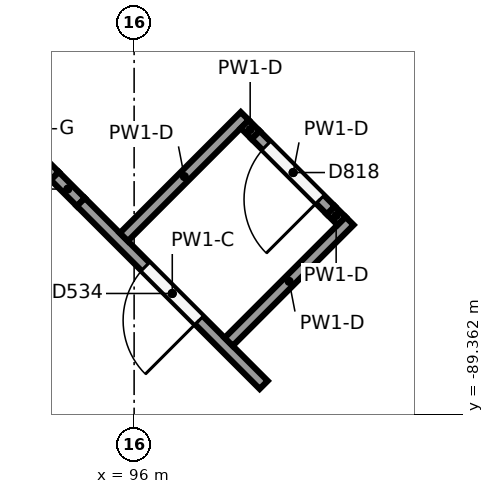
"""IFC4 building model, lengths in metres.
Left out: names, types, materials, properties, quantities, classifications, styles, units other than length and angle.
Written with IfcOpenShell. Run it as: python <this file> out.ifc"""

import sys

from ifc_helpers import new_model, si_unit, direction, frame, frame_2d, origin, origin_2d, place, context, subcontext, project, spatial, rectangle, circle, extrude, element, fill, save


model = new_model("IFC4")
c1 = context("Model", 3, precision=1e-05, world=origin(), true_north=direction((0.0, 1.0)))
c2 = subcontext(c1, "Body", "Model", "MODEL_VIEW")
j1 = project(units=[si_unit("LENGTHUNIT", "METRE"), si_unit("PLANEANGLEUNIT", "RADIAN")], contexts=[c1])
p1 = place(None, origin())
s1 = spatial("IfcSite", under=j1, at=p1, CompositionType="ELEMENT")
p2 = place(p1, origin())
s2 = spatial("IfcBuilding", under=s1, at=p2, CompositionType="ELEMENT")
p3 = place(p2, origin())
s3 = spatial("IfcBuildingStorey", under=s2, at=p3, CompositionType="ELEMENT", Elevation=0.0)
p4 = place(p3, frame((95.793, -85.201, -0.3), z_axis=(0.0, 0.0, 1.0), x_axis=(1.0, 0.0, 0.0)))
e1 = element("IfcColumn", 1, at=p4, inside=s3, PredefinedType="COLUMN", context=c2, shape_type="SweptSolid", body=[
    extrude(circle(Radius=0.3, at=origin_2d()), origin(), (0.0, 0.0, 1.0), 6.8),
])
for number, where, z_axis, x_axis in (
    (2, (94.612, -85.884, 0.0), (0.0, 0.0, 1.0), (0.707, -0.707, 0.0)),
    (3, (94.956, -86.228, 0.0), (0.0, 0.0, 1.0), (0.707, -0.707, 0.0)),
):
    element("IfcWall", number, at=place(p3, frame(where, z_axis=z_axis, x_axis=x_axis)), inside=s3, PredefinedType="PARTITIONING", context=c2, shape_type="SweptSolid", body=[
        extrude(rectangle(XDim=0.486, YDim=0.15, at=frame_2d((0.243, 0.0))), origin(), (0.0, 0.0, 1.0), 5.4),
    ])
p5 = place(p3, frame((97.704, -88.977, 0.0), z_axis=(0.0, 0.0, 1.0), x_axis=(-0.707070891996, 0.707142668556, 0.0)))
e4 = element("IfcWall", 4, at=p5, inside=s3, PredefinedType="PARTITIONING", context=c2, shape_type="SweptSolid", body=[
    extrude(rectangle(XDim=3.401, YDim=0.15, at=frame_2d((1.701, 0.0))), origin(), (0.0, 0.0, 1.0), 6.05),
])
p6 = place(p5, frame((1.201, 0.0, 0.0)))
e5 = element("IfcOpeningElement", 5, at=p6, cuts=e4, PredefinedType="OPENING", context=c2, shape_type="SweptSolid", body=[
    extrude(rectangle(XDim=1.0, YDim=2.1, at=frame_2d((0.5, 1.05))), frame((0.0, 0.085, 0.0), z_axis=(0.0, -1.0, 0.0), x_axis=(1.0, 0.0, 0.0)), (0.0, 0.0, 1.0), 0.17),
])
for number, where, z_axis, x_axis in (
    (6, (97.244, -88.41, 0.0), (0.0, 0.0, 1.0), (0.707, 0.707, 0.0)),
    (7, (95.865, -87.031, 0.0), (0.0, 0.0, 1.0), (0.707, 0.707, 0.0)),
):
    element("IfcWall", number, at=place(p3, frame(where, z_axis=z_axis, x_axis=x_axis)), inside=s3, PredefinedType="PARTITIONING", context=c2, shape_type="SweptSolid", body=[
        extrude(rectangle(XDim=2.25, YDim=0.15, at=frame_2d((1.125, 0.0))), origin(), (0.0, 0.0, 1.0), 6.1),
    ])
p7 = place(p3, frame((98.729, -86.819, 0.0), z_axis=(0.0, 0.0, 1.0), x_axis=(-0.707106781187, 0.707106781187, 0.0)))
e8 = element("IfcWall", 8, at=p7, inside=s3, PredefinedType="PARTITIONING", context=c2, shape_type="SweptSolid", body=[
    extrude(rectangle(XDim=0.2, YDim=0.15, at=frame_2d((0.1, 0.0))), origin(), (0.0, 0.0, 1.0), 6.1),
])
p8 = place(p3, frame((98.587, -86.677, 0.0), z_axis=(0.0, 0.0, 1.0), x_axis=(-0.707106781187, 0.707106781187, 0.0)))
e9 = element("IfcWall", 9, at=p8, inside=s3, PredefinedType="PARTITIONING", context=c2, shape_type="SweptSolid", body=[
    extrude(rectangle(XDim=1.4, YDim=0.15, at=frame_2d((0.7, 0.0))), origin(), (0.0, 0.0, 1.0), 6.1),
])
p9 = place(p8, frame((0.2, 0.0, 0.0)))
e10 = element("IfcOpeningElement", 10, at=p9, cuts=e9, PredefinedType="OPENING", context=c2, shape_type="SweptSolid", body=[
    extrude(rectangle(XDim=1.0, YDim=2.1, at=frame_2d((0.5, 1.05))), frame((0.0, 0.085, 0.0), z_axis=(0.0, -1.0, 0.0), x_axis=(1.0, 0.0, 0.0)), (0.0, 0.0, 1.0), 0.17),
])
p10 = place(p3, frame((97.597, -85.688, 0.0), z_axis=(0.0, 0.0, 1.0), x_axis=(-0.707106781187, 0.707106781187, 0.0)))
e11 = element("IfcWall", 11, at=p10, inside=s3, PredefinedType="PARTITIONING", context=c2, shape_type="SweptSolid", body=[
    extrude(rectangle(XDim=0.2, YDim=0.15, at=frame_2d((0.1, 0.0))), origin(), (0.0, 0.0, 1.0), 6.1),
])
p11 = place(p6, origin())
e12 = element("IfcDoor", 12, at=p11, inside=s3, OperationType="SINGLE_SWING_LEFT", PredefinedType="DOOR", context=c2, shape_type="SweptSolid", body=[
    extrude(rectangle(XDim=1.0, YDim=2.1, at=frame_2d((0.5, 1.05))), frame((0.0, 0.025, 0.0), z_axis=(0.0, -1.0, 0.0), x_axis=(1.0, 0.0, 0.0)), (0.0, 0.0, 1.0), 0.05),
])
fill(e5, e12)
p12 = place(p9, origin())
e13 = element("IfcDoor", 13, at=p12, inside=s3, OperationType="SINGLE_SWING_LEFT", PredefinedType="DOOR", context=c2, shape_type="SweptSolid", body=[
    extrude(rectangle(XDim=1.0, YDim=2.1, at=frame_2d((0.5, 1.05))), frame((0.0, 0.025, 0.0), z_axis=(0.0, -1.0, 0.0), x_axis=(1.0, 0.0, 0.0)), (0.0, 0.0, 1.0), 0.05),
])
fill(e10, e13)
save(model, sys.argv[1])
